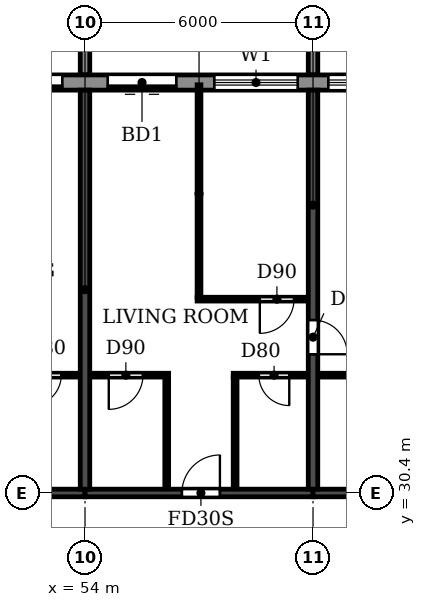
"""IFC4 building model, lengths in metres.
Left out: names, types, materials, properties, quantities, classifications, styles, units other than length and angle.
Written with IfcOpenShell. Run it as: python <this file> out.ifc"""

import sys

from ifc_helpers import new_model, si_unit, direction, frame, frame_2d, origin, place, context, subcontext, project, spatial, polyline, rectangle, outline, extrude, source, transform, mapped, element, fill, save


model = new_model("IFC4")
c1 = context("Model", 3, precision=1e-05, world=origin(), true_north=direction((0.0, 1.0)))
c2 = subcontext(c1, "Body", "Model", "MODEL_VIEW")
j1 = project(units=[si_unit("LENGTHUNIT", "METRE"), si_unit("PLANEANGLEUNIT", "RADIAN")], contexts=[c1])
p1 = place(None, origin())
s1 = spatial("IfcSite", under=j1, at=p1, CompositionType="ELEMENT")
p2 = place(p1, origin())
s2 = spatial("IfcBuilding", under=s1, at=p2, CompositionType="ELEMENT")
p3 = place(p2, frame((0.0, 0.0, 257.7)))
s3 = spatial("IfcBuildingStorey", under=s2, at=p3, CompositionType="ELEMENT", Elevation=257.7)
p4 = place(p3, frame((54.0, 30.5, 0.0), z_axis=(0.0, 0.0, 1.0), x_axis=(0.0, 1.0, 0.0)))
e1 = element("IfcWall", 1, at=p4, inside=s3, PredefinedType="SHEAR", context=c2, shape_type="SweptSolid", body=[
    extrude(rectangle(XDim=10.5, YDim=0.25, at=frame_2d((5.25, 0.0))), origin(), (0.0, 0.0, 1.0), 3.0),
])
p5 = place(p3, frame((60.0, 30.5, 0.0), z_axis=(0.0, 0.0, 1.0), x_axis=(0.0, 1.0, 0.0)))
e2 = element("IfcWall", 2, at=p5, inside=s3, PredefinedType="SHEAR", context=c2, shape_type="SweptSolid", body=[
    extrude(rectangle(XDim=10.5, YDim=0.25, at=frame_2d((5.25, 0.0))), origin(), (0.0, 0.0, 1.0), 3.0),
])
p6 = place(p5, frame((3.55, 0.0, 0.0)))
e3 = element("IfcOpeningElement", 3, at=p6, cuts=e2, PredefinedType="OPENING", context=c2, shape_type="SweptSolid", body=[
    extrude(rectangle(XDim=0.9, YDim=2.1, at=frame_2d((0.45, 1.05))), frame((0.0, 0.135, 0.0), z_axis=(0.0, -1.0, 0.0), x_axis=(1.0, 0.0, 0.0)), (0.0, 0.0, 1.0), 0.27),
])
p7 = place(p3, frame((48.0, 30.4, 0.0), z_axis=(0.0, 0.0, 1.0), x_axis=(1.0, 0.0, 0.0)))
e4 = element("IfcWall", 4, at=p7, inside=s3, PredefinedType="SHEAR", context=c2, shape_type="SweptSolid", body=[
    extrude(rectangle(XDim=6.0, YDim=0.2, at=frame_2d((3.0, 0.0))), origin(), (0.0, 0.0, 1.0), 2.4),
])
p8 = place(p7, frame((2.55, 0.0, 0.0)))
e5 = element("IfcOpeningElement", 5, at=p8, cuts=e4, PredefinedType="OPENING", context=c2, shape_type="SweptSolid", body=[
    extrude(rectangle(XDim=1.0, YDim=2.1, at=frame_2d((0.5, 1.05))), frame((0.0, 0.11, 0.0), z_axis=(0.0, -1.0, 0.0), x_axis=(1.0, 0.0, 0.0)), (0.0, 0.0, 1.0), 0.22),
])
p9 = place(p3, frame((54.0, 30.4, 0.0), z_axis=(0.0, 0.0, 1.0), x_axis=(1.0, 0.0, 0.0)))
e6 = element("IfcWall", 6, at=p9, inside=s3, PredefinedType="SHEAR", context=c2, shape_type="SweptSolid", body=[
    extrude(rectangle(XDim=6.0, YDim=0.2, at=frame_2d((3.0, 0.0))), origin(), (0.0, 0.0, 1.0), 2.4),
])
p10 = place(p9, frame((2.55, 0.0, 0.0)))
e7 = element("IfcOpeningElement", 7, at=p10, cuts=e6, PredefinedType="OPENING", context=c2, shape_type="SweptSolid", body=[
    extrude(rectangle(XDim=1.0, YDim=2.1, at=frame_2d((0.5, 1.05))), frame((0.0, 0.11, 0.0), z_axis=(0.0, -1.0, 0.0), x_axis=(1.0, 0.0, 0.0)), (0.0, 0.0, 1.0), 0.22),
])
p11 = place(p3, frame((60.0, 30.4, 0.0), z_axis=(0.0, 0.0, 1.0), x_axis=(1.0, 0.0, 0.0)))
e8 = element("IfcWall", 8, at=p11, inside=s3, PredefinedType="SHEAR", context=c2, shape_type="SweptSolid", body=[
    extrude(rectangle(XDim=6.0, YDim=0.2, at=frame_2d((3.0, 0.0))), origin(), (0.0, 0.0, 1.0), 2.4),
])
p12 = place(p3, frame((79.317, 41.2, 0.0), z_axis=(0.0, 0.0, 1.0), x_axis=(-1.0, 0.0, 0.0)))
e9 = element("IfcWall", 9, at=p12, inside=s3, PredefinedType="STANDARD", context=c2, shape_type="SweptSolid", body=[
    extrude(rectangle(XDim=56.634, YDim=0.4, at=frame_2d((28.317, 0.0))), origin(), (0.0, 0.0, 1.0), 3.0),
])
p13 = place(p12, frame((52.717, 0.0, 0.9)))
e10 = element("IfcOpeningElement", 10, at=p13, cuts=e9, PredefinedType="OPENING", context=c2, shape_type="SweptSolid", body=[
    extrude(rectangle(XDim=2.2, YDim=1.5, at=frame_2d((1.1, 0.75))), frame((0.0, 0.21, 0.0), z_axis=(0.0, -1.0, 0.0), x_axis=(1.0, 0.0, 0.0)), (0.0, 0.0, 1.0), 0.42),
])
p14 = place(p12, frame((49.717, 0.0, 0.9)))
e11 = element("IfcOpeningElement", 11, at=p14, cuts=e9, PredefinedType="OPENING", context=c2, shape_type="SweptSolid", body=[
    extrude(rectangle(XDim=2.2, YDim=1.5, at=frame_2d((1.1, 0.75))), frame((0.0, 0.21, 0.0), z_axis=(0.0, -1.0, 0.0), x_axis=(1.0, 0.0, 0.0)), (0.0, 0.0, 1.0), 0.42),
])
p15 = place(p12, frame((46.717, 0.0, 0.9)))
e12 = element("IfcOpeningElement", 12, at=p15, cuts=e9, PredefinedType="OPENING", context=c2, shape_type="SweptSolid", body=[
    extrude(rectangle(XDim=2.2, YDim=1.5, at=frame_2d((1.1, 0.75))), frame((0.0, 0.21, 0.0), z_axis=(0.0, -1.0, 0.0), x_axis=(1.0, 0.0, 0.0)), (0.0, 0.0, 1.0), 0.42),
])
p16 = place(p12, frame((43.917, 0.0, 0.0)))
e13 = element("IfcOpeningElement", 13, at=p16, cuts=e9, PredefinedType="OPENING", context=c2, shape_type="SweptSolid", body=[
    extrude(rectangle(XDim=1.8, YDim=2.4, at=frame_2d((0.9, 1.2))), frame((0.0, 0.21, 0.0), z_axis=(0.0, -1.0, 0.0), x_axis=(1.0, 0.0, 0.0)), (0.0, 0.0, 1.0), 0.42),
])
p17 = place(p12, frame((40.717, 0.0, 0.9)))
e14 = element("IfcOpeningElement", 14, at=p17, cuts=e9, PredefinedType="OPENING", context=c2, shape_type="SweptSolid", body=[
    extrude(rectangle(XDim=2.2, YDim=1.5, at=frame_2d((1.1, 0.75))), frame((0.0, 0.21, 0.0), z_axis=(0.0, -1.0, 0.0), x_axis=(1.0, 0.0, 0.0)), (0.0, 0.0, 1.0), 0.42),
])
p18 = place(p12, frame((37.917, 0.0, 0.0)))
e15 = element("IfcOpeningElement", 15, at=p18, cuts=e9, PredefinedType="OPENING", context=c2, shape_type="SweptSolid", body=[
    extrude(rectangle(XDim=1.8, YDim=2.4, at=frame_2d((0.9, 1.2))), frame((0.0, 0.21, 0.0), z_axis=(0.0, -1.0, 0.0), x_axis=(1.0, 0.0, 0.0)), (0.0, 0.0, 1.0), 0.42),
])
p19 = place(p12, frame((34.717, 0.0, 0.9)))
e16 = element("IfcOpeningElement", 16, at=p19, cuts=e9, PredefinedType="OPENING", context=c2, shape_type="SweptSolid", body=[
    extrude(rectangle(XDim=2.2, YDim=1.5, at=frame_2d((1.1, 0.75))), frame((0.0, 0.21, 0.0), z_axis=(0.0, -1.0, 0.0), x_axis=(1.0, 0.0, 0.0)), (0.0, 0.0, 1.0), 0.42),
])
p20 = place(p12, frame((31.717, 0.0, 0.9)))
e17 = element("IfcOpeningElement", 17, at=p20, cuts=e9, PredefinedType="OPENING", context=c2, shape_type="SweptSolid", body=[
    extrude(rectangle(XDim=2.2, YDim=1.5, at=frame_2d((1.1, 0.75))), frame((0.0, 0.21, 0.0), z_axis=(0.0, -1.0, 0.0), x_axis=(1.0, 0.0, 0.0)), (0.0, 0.0, 1.0), 0.42),
])
p21 = place(p12, frame((28.717, 0.0, 0.9)))
e18 = element("IfcOpeningElement", 18, at=p21, cuts=e9, PredefinedType="OPENING", context=c2, shape_type="SweptSolid", body=[
    extrude(rectangle(XDim=2.2, YDim=1.5, at=frame_2d((1.1, 0.75))), frame((0.0, 0.21, 0.0), z_axis=(0.0, -1.0, 0.0), x_axis=(1.0, 0.0, 0.0)), (0.0, 0.0, 1.0), 0.42),
])
p22 = place(p12, frame((25.917, 0.0, 0.0)))
e19 = element("IfcOpeningElement", 19, at=p22, cuts=e9, PredefinedType="OPENING", context=c2, shape_type="SweptSolid", body=[
    extrude(rectangle(XDim=1.8, YDim=2.4, at=frame_2d((0.9, 1.2))), frame((0.0, 0.21, 0.0), z_axis=(0.0, -1.0, 0.0), x_axis=(1.0, 0.0, 0.0)), (0.0, 0.0, 1.0), 0.42),
])
p23 = place(p12, frame((22.917, 0.0, 0.0)))
e20 = element("IfcOpeningElement", 20, at=p23, cuts=e9, PredefinedType="OPENING", context=c2, shape_type="SweptSolid", body=[
    extrude(rectangle(XDim=1.8, YDim=2.4, at=frame_2d((0.9, 1.2))), frame((0.0, 0.21, 0.0), z_axis=(0.0, -1.0, 0.0), x_axis=(1.0, 0.0, 0.0)), (0.0, 0.0, 1.0), 0.42),
])
p24 = place(p12, frame((19.717, 0.0, 0.9)))
e21 = element("IfcOpeningElement", 21, at=p24, cuts=e9, PredefinedType="OPENING", context=c2, shape_type="SweptSolid", body=[
    extrude(rectangle(XDim=2.2, YDim=1.5, at=frame_2d((1.1, 0.75))), frame((0.0, 0.21, 0.0), z_axis=(0.0, -1.0, 0.0), x_axis=(1.0, 0.0, 0.0)), (0.0, 0.0, 1.0), 0.42),
])
p25 = place(p12, frame((16.717, 0.0, 0.9)))
e22 = element("IfcOpeningElement", 22, at=p25, cuts=e9, PredefinedType="OPENING", context=c2, shape_type="SweptSolid", body=[
    extrude(rectangle(XDim=2.2, YDim=1.5, at=frame_2d((1.1, 0.75))), frame((0.0, 0.21, 0.0), z_axis=(0.0, -1.0, 0.0), x_axis=(1.0, 0.0, 0.0)), (0.0, 0.0, 1.0), 0.42),
])
p26 = place(p12, frame((13.717, 0.0, 0.9)))
e23 = element("IfcOpeningElement", 23, at=p26, cuts=e9, PredefinedType="OPENING", context=c2, shape_type="SweptSolid", body=[
    extrude(rectangle(XDim=2.2, YDim=1.5, at=frame_2d((1.1, 0.75))), frame((0.0, 0.21, 0.0), z_axis=(0.0, -1.0, 0.0), x_axis=(1.0, 0.0, 0.0)), (0.0, 0.0, 1.0), 0.42),
])
p27 = place(p12, frame((10.717, 0.0, 0.9)))
e24 = element("IfcOpeningElement", 24, at=p27, cuts=e9, PredefinedType="OPENING", context=c2, shape_type="SweptSolid", body=[
    extrude(rectangle(XDim=2.2, YDim=1.5, at=frame_2d((1.1, 0.75))), frame((0.0, 0.21, 0.0), z_axis=(0.0, -1.0, 0.0), x_axis=(1.0, 0.0, 0.0)), (0.0, 0.0, 1.0), 0.42),
])
p28 = place(p12, frame((7.917, 0.0, 0.0)))
e25 = element("IfcOpeningElement", 25, at=p28, cuts=e9, PredefinedType="OPENING", context=c2, shape_type="SweptSolid", body=[
    extrude(rectangle(XDim=1.8, YDim=2.4, at=frame_2d((0.9, 1.2))), frame((0.0, 0.21, 0.0), z_axis=(0.0, -1.0, 0.0), x_axis=(1.0, 0.0, 0.0)), (0.0, 0.0, 1.0), 0.42),
])
p29 = place(p12, frame((4.717, 0.0, 0.9)))
e26 = element("IfcOpeningElement", 26, at=p29, cuts=e9, PredefinedType="OPENING", context=c2, shape_type="SweptSolid", body=[
    extrude(rectangle(XDim=2.2, YDim=1.5, at=frame_2d((1.1, 0.75))), frame((0.0, 0.21, 0.0), z_axis=(0.0, -1.0, 0.0), x_axis=(1.0, 0.0, 0.0)), (0.0, 0.0, 1.0), 0.42),
])
p30 = place(p12, frame((1.917, 0.0, 0.0)))
e27 = element("IfcOpeningElement", 27, at=p30, cuts=e9, PredefinedType="OPENING", context=c2, shape_type="SweptSolid", body=[
    extrude(rectangle(XDim=1.8, YDim=2.4, at=frame_2d((0.9, 1.2))), frame((0.0, 0.21, 0.0), z_axis=(0.0, -1.0, 0.0), x_axis=(1.0, 0.0, 0.0)), (0.0, 0.0, 1.0), 0.42),
])
m1 = source(origin(), c2, "Body", "SweptSolid", [
    extrude(outline(polyline([(0.0, 0.0), (0.25, 0.0), (0.25, 3.1), (0.0, 3.1), (0.0, 0.0)])), origin(), (0.0, 0.0, 1.0), 3.1),
])
for number, where in (
    (28, (53.875, 41.4, 0.0)),
    (29, (59.875, 41.4, 0.0)),
):
    element("IfcWall", number, at=place(p3, frame(where)), inside=s3, PredefinedType="STANDARD", context=c2, shape_type="MappedRepresentation", body=[
        mapped(m1, transform((0.0, 0.0, 0.0))),
    ])
p31 = place(p3, frame((51.9, 33.5, 0.0), z_axis=(0.0, 0.0, 1.0), x_axis=(1.0, 0.0, 0.0)))
e30 = element("IfcWall", 30, at=p31, inside=s3, PredefinedType="PARTITIONING", context=c2, shape_type="SweptSolid", body=[
    extrude(rectangle(XDim=1.965, YDim=0.1, at=frame_2d((0.982, 0.0))), origin(), (0.0, 0.0, 1.0), 3.0),
])
p32 = place(p31, frame((0.675, 0.0, 0.0)))
e31 = element("IfcOpeningElement", 31, at=p32, cuts=e30, PredefinedType="OPENING", context=c2, shape_type="SweptSolid", body=[
    extrude(rectangle(XDim=0.8, YDim=2.1, at=frame_2d((0.4, 1.05))), frame((0.0, 0.06, 0.0), z_axis=(0.0, -1.0, 0.0), x_axis=(1.0, 0.0, 0.0)), (0.0, 0.0, 1.0), 0.12),
])
p33 = place(p3, frame((54.135, 33.5, 0.0), z_axis=(0.0, 0.0, 1.0), x_axis=(1.0, 0.0, 0.0)))
e32 = element("IfcWall", 32, at=p33, inside=s3, PredefinedType="PARTITIONING", context=c2, shape_type="SweptSolid", body=[
    extrude(rectangle(XDim=2.065, YDim=0.1, at=frame_2d((1.032, 0.0))), origin(), (0.0, 0.0, 1.0), 3.0),
])
p34 = place(p33, frame((0.49, 0.0, 0.0)))
e33 = element("IfcOpeningElement", 33, at=p34, cuts=e32, PredefinedType="OPENING", context=c2, shape_type="SweptSolid", body=[
    extrude(rectangle(XDim=0.9, YDim=2.1, at=frame_2d((0.45, 1.05))), frame((0.0, 0.06, 0.0), z_axis=(0.0, -1.0, 0.0), x_axis=(1.0, 0.0, 0.0)), (0.0, 0.0, 1.0), 0.12),
])
p35 = place(p3, frame((57.9, 33.5, 0.0), z_axis=(0.0, 0.0, 1.0), x_axis=(1.0, 0.0, 0.0)))
e34 = element("IfcWall", 34, at=p35, inside=s3, PredefinedType="PARTITIONING", context=c2, shape_type="SweptSolid", body=[
    extrude(rectangle(XDim=1.965, YDim=0.1, at=frame_2d((0.982, 0.0))), origin(), (0.0, 0.0, 1.0), 3.0),
])
p36 = place(p35, frame((0.675, 0.0, 0.0)))
e35 = element("IfcOpeningElement", 35, at=p36, cuts=e34, PredefinedType="OPENING", context=c2, shape_type="SweptSolid", body=[
    extrude(rectangle(XDim=0.8, YDim=2.1, at=frame_2d((0.4, 1.05))), frame((0.0, 0.06, 0.0), z_axis=(0.0, -1.0, 0.0), x_axis=(1.0, 0.0, 0.0)), (0.0, 0.0, 1.0), 0.12),
])
p37 = place(p3, frame((60.135, 33.5, 0.0), z_axis=(0.0, 0.0, 1.0), x_axis=(1.0, 0.0, 0.0)))
e36 = element("IfcWall", 36, at=p37, inside=s3, PredefinedType="PARTITIONING", context=c2, shape_type="SweptSolid", body=[
    extrude(rectangle(XDim=2.965, YDim=0.1, at=frame_2d((1.482, 0.0))), origin(), (0.0, 0.0, 1.0), 3.0),
])
p38 = place(p37, frame((0.965, 0.0, 0.0)))
e37 = element("IfcOpeningElement", 37, at=p38, cuts=e36, PredefinedType="OPENING", context=c2, shape_type="SweptSolid", body=[
    extrude(rectangle(XDim=0.8, YDim=2.1, at=frame_2d((0.4, 1.05))), frame((0.0, 0.06, 0.0), z_axis=(0.0, -1.0, 0.0), x_axis=(1.0, 0.0, 0.0)), (0.0, 0.0, 1.0), 0.12),
])
p39 = place(p3, frame((56.95, 35.5, 0.0), z_axis=(0.0, 0.0, 1.0), x_axis=(1.0, 0.0, 0.0)))
e38 = element("IfcWall", 38, at=p39, inside=s3, PredefinedType="PARTITIONING", context=c2, shape_type="SweptSolid", body=[
    extrude(rectangle(XDim=2.915, YDim=0.1, at=frame_2d((1.458, 0.0))), origin(), (0.0, 0.0, 1.0), 3.0),
])
p40 = place(p39, frame((1.65, 0.0, 0.0)))
e39 = element("IfcOpeningElement", 39, at=p40, cuts=e38, PredefinedType="OPENING", context=c2, shape_type="SweptSolid", body=[
    extrude(rectangle(XDim=0.9, YDim=2.1, at=frame_2d((0.45, 1.05))), frame((0.0, 0.06, 0.0), z_axis=(0.0, -1.0, 0.0), x_axis=(1.0, 0.0, 0.0)), (0.0, 0.0, 1.0), 0.12),
])
p41 = place(p3, frame((56.15, 30.51, 0.0), z_axis=(0.0, 0.0, 1.0), x_axis=(0.0, 1.0, 0.0)))
e40 = element("IfcWall", 40, at=p41, inside=s3, PredefinedType="PARTITIONING", context=c2, shape_type="SweptSolid", body=[
    extrude(rectangle(XDim=2.94, YDim=0.1, at=frame_2d((1.47, 0.0))), origin(), (0.0, 0.0, 1.0), 3.0),
])
p42 = place(p3, frame((57.0, 35.55, 0.0), z_axis=(0.0, 0.0, 1.0), x_axis=(0.0, 1.0, 0.0)))
e41 = element("IfcWall", 41, at=p42, inside=s3, PredefinedType="PARTITIONING", context=c2, shape_type="SweptSolid", body=[
    extrude(rectangle(XDim=5.59, YDim=0.1, at=frame_2d((2.795, 0.0))), origin(), (0.0, 0.0, 1.0), 3.0),
])
p43 = place(p3, frame((57.95, 30.51, 0.0), z_axis=(0.0, 0.0, 1.0), x_axis=(0.0, 1.0, 0.0)))
e42 = element("IfcWall", 42, at=p43, inside=s3, PredefinedType="PARTITIONING", context=c2, shape_type="SweptSolid", body=[
    extrude(rectangle(XDim=2.94, YDim=0.1, at=frame_2d((1.47, 0.0))), origin(), (0.0, 0.0, 1.0), 3.0),
])
p44 = place(p22, origin())
e43 = element("IfcDoor", 43, at=p44, inside=s3, OperationType="DOUBLE_DOOR_SLIDING", PredefinedType="DOOR", context=c2, shape_type="SweptSolid", body=[
    extrude(rectangle(XDim=1.8, YDim=2.4, at=frame_2d((0.9, 1.2))), frame((0.0, 0.025, 0.0), z_axis=(0.0, -1.0, 0.0), x_axis=(1.0, 0.0, 0.0)), (0.0, 0.0, 1.0), 0.05),
])
fill(e19, e43)
p45 = place(p23, origin())
e44 = element("IfcDoor", 44, at=p45, inside=s3, OperationType="DOUBLE_DOOR_SLIDING", PredefinedType="DOOR", context=c2, shape_type="SweptSolid", body=[
    extrude(rectangle(XDim=1.8, YDim=2.4, at=frame_2d((0.9, 1.2))), frame((0.0, 0.025, 0.0), z_axis=(0.0, -1.0, 0.0), x_axis=(1.0, 0.0, 0.0)), (0.0, 0.0, 1.0), 0.05),
])
fill(e20, e44)
p46 = place(p24, origin())
e45 = element("IfcWindow", 45, at=p46, inside=s3, PartitioningType="DOUBLE_PANEL_HORIZONTAL", PredefinedType="WINDOW", context=c2, shape_type="SweptSolid", body=[
    extrude(rectangle(XDim=2.2, YDim=1.5, at=frame_2d((1.1, 0.75))), frame((0.0, 0.03, 0.0), z_axis=(0.0, -1.0, 0.0), x_axis=(1.0, 0.0, 0.0)), (0.0, 0.0, 1.0), 0.06),
])
fill(e21, e45)
p47 = place(p25, origin())
e46 = element("IfcWindow", 46, at=p47, inside=s3, PartitioningType="DOUBLE_PANEL_HORIZONTAL", PredefinedType="WINDOW", context=c2, shape_type="SweptSolid", body=[
    extrude(rectangle(XDim=2.2, YDim=1.5, at=frame_2d((1.1, 0.75))), frame((0.0, 0.03, 0.0), z_axis=(0.0, -1.0, 0.0), x_axis=(1.0, 0.0, 0.0)), (0.0, 0.0, 1.0), 0.06),
])
fill(e22, e46)
p48 = place(p32, frame((0.8, 0.0, 0.0), z_axis=(0.0, 0.0, 1.0), x_axis=(-1.0, 0.0, 0.0)))
e47 = element("IfcDoor", 47, at=p48, inside=s3, OperationType="SINGLE_SWING_RIGHT", PredefinedType="DOOR", context=c2, shape_type="SweptSolid", body=[
    extrude(rectangle(XDim=0.8, YDim=2.1, at=frame_2d((0.4, 1.05))), frame((0.0, 0.025, 0.0), z_axis=(0.0, -1.0, 0.0), x_axis=(1.0, 0.0, 0.0)), (0.0, 0.0, 1.0), 0.05),
])
fill(e31, e47)
p49 = place(p34, frame((0.9, 0.0, 0.0), z_axis=(0.0, 0.0, 1.0), x_axis=(-1.0, 0.0, 0.0)))
e48 = element("IfcDoor", 48, at=p49, inside=s3, OperationType="SINGLE_SWING_RIGHT", PredefinedType="DOOR", context=c2, shape_type="SweptSolid", body=[
    extrude(rectangle(XDim=0.9, YDim=2.1, at=frame_2d((0.45, 1.05))), frame((0.0, 0.025, 0.0), z_axis=(0.0, -1.0, 0.0), x_axis=(1.0, 0.0, 0.0)), (0.0, 0.0, 1.0), 0.05),
])
fill(e33, e48)
p50 = place(p10, origin())
e49 = element("IfcDoor", 49, at=p50, inside=s3, OperationType="SINGLE_SWING_RIGHT", PredefinedType="DOOR", context=c2, shape_type="SweptSolid", body=[
    extrude(rectangle(XDim=1.0, YDim=2.1, at=frame_2d((0.5, 1.05))), frame((0.0, 0.025, 0.0), z_axis=(0.0, -1.0, 0.0), x_axis=(1.0, 0.0, 0.0)), (0.0, 0.0, 1.0), 0.05),
])
fill(e7, e49)
p51 = place(p36, frame((0.8, 0.0, 0.0), z_axis=(0.0, 0.0, 1.0), x_axis=(-1.0, 0.0, 0.0)))
e50 = element("IfcDoor", 50, at=p51, inside=s3, OperationType="SINGLE_SWING_LEFT", PredefinedType="DOOR", context=c2, shape_type="SweptSolid", body=[
    extrude(rectangle(XDim=0.8, YDim=2.1, at=frame_2d((0.4, 1.05))), frame((0.0, 0.025, 0.0), z_axis=(0.0, -1.0, 0.0), x_axis=(1.0, 0.0, 0.0)), (0.0, 0.0, 1.0), 0.05),
])
fill(e35, e50)
p52 = place(p40, frame((0.9, 0.0, 0.0), z_axis=(0.0, 0.0, 1.0), x_axis=(-1.0, 0.0, 0.0)))
e51 = element("IfcDoor", 51, at=p52, inside=s3, OperationType="SINGLE_SWING_RIGHT", PredefinedType="DOOR", context=c2, shape_type="SweptSolid", body=[
    extrude(rectangle(XDim=0.9, YDim=2.1, at=frame_2d((0.45, 1.05))), frame((0.0, 0.025, 0.0), z_axis=(0.0, -1.0, 0.0), x_axis=(1.0, 0.0, 0.0)), (0.0, 0.0, 1.0), 0.05),
])
fill(e39, e51)
p53 = place(p6, frame((0.9, 0.0, 0.0), z_axis=(0.0, 0.0, 1.0), x_axis=(-1.0, 0.0, 0.0)))
e52 = element("IfcDoor", 52, at=p53, inside=s3, OperationType="SINGLE_SWING_RIGHT", PredefinedType="DOOR", context=c2, shape_type="SweptSolid", body=[
    extrude(rectangle(XDim=0.9, YDim=2.1, at=frame_2d((0.45, 1.05))), frame((0.0, 0.025, 0.0), z_axis=(0.0, -1.0, 0.0), x_axis=(1.0, 0.0, 0.0)), (0.0, 0.0, 1.0), 0.05),
])
fill(e3, e52)
save(model, sys.argv[1])
